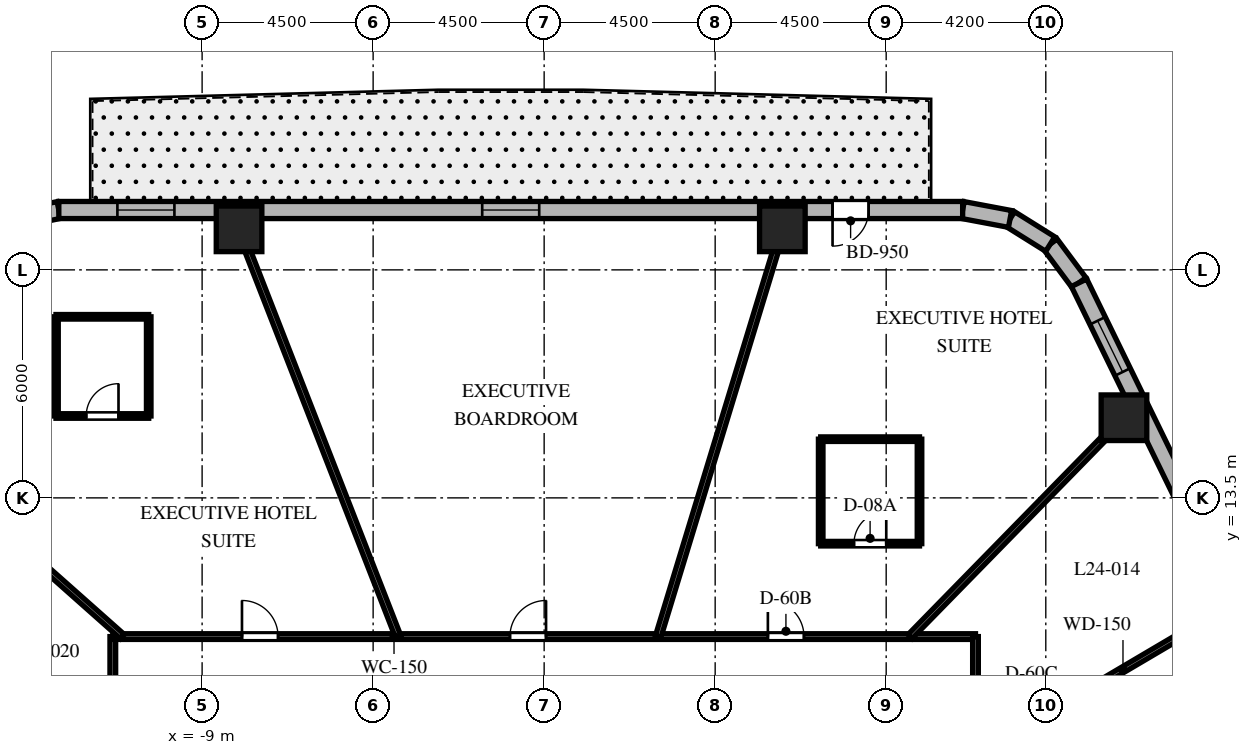
"""IFC4 building model, lengths in metres.
Left out: names, types, materials, properties, quantities, classifications, styles, units other than length and angle.
Written with IfcOpenShell. Run it as: python <this file> out.ifc"""

import sys

from ifc_helpers import new_model, si_unit, direction, frame, frame_2d, origin, origin_2d, place, context, subcontext, project, spatial, rectangle, extrude, element, fill, save


model = new_model("IFC4")
c1 = context("Model", 3, precision=1e-05, world=origin(), true_north=direction((0.0, 1.0)))
c2 = subcontext(c1, "Body", "Model", "MODEL_VIEW")
j1 = project(units=[si_unit("LENGTHUNIT", "METRE"), si_unit("PLANEANGLEUNIT", "RADIAN")], contexts=[c1])
p1 = place(None, origin())
s1 = spatial("IfcSite", under=j1, at=p1, CompositionType="ELEMENT")
p2 = place(p1, origin())
s2 = spatial("IfcBuilding", under=s1, at=p2, CompositionType="ELEMENT")
p3 = place(p2, frame((0.0, 0.0, 102.5)))
s3 = spatial("IfcBuildingStorey", under=s2, at=p3, CompositionType="ELEMENT", Elevation=102.5)
for number, where, z_axis, x_axis in (
    (1, (15.257, 15.609, 0.0), (0.0, 0.0, 1.0), (1.0, 0.0, 0.0)),
    (2, (6.268, 20.58, 0.0), (0.0, 0.0, 1.0), (1.0, 0.0, 0.0)),
    (3, (-8.028, 20.58, 0.0), (0.0, 0.0, 1.0), (1.0, 0.0, 0.0)),
):
    element("IfcColumn", number, at=place(p3, frame(where, z_axis=z_axis, x_axis=x_axis)), inside=s3, PredefinedType="COLUMN", context=c2, shape_type="SweptSolid", body=[
        extrude(rectangle(XDim=1.2, YDim=1.2, at=origin_2d()), origin(), (0.0, 0.0, 1.0), 3.7),
    ])
p4 = place(p3, frame((14.076, 19.161, 0.0), z_axis=(0.0, 0.0, 1.0), x_axis=(-0.597226657159, 0.802072515412, 0.0)))
e4 = element("IfcWall", 4, at=p4, inside=s3, PredefinedType="SOLIDWALL", context=c2, shape_type="SweptSolid", body=[
    extrude(rectangle(XDim=1.269, YDim=0.45, at=frame_2d((0.635, 0.0))), origin(), (0.0, 0.0, 1.0), 3.4),
])
p5 = place(p3, frame((13.318, 20.179, 0.0), z_axis=(0.0, 0.0, 1.0), x_axis=(-0.848031272749, 0.529946186362, 0.0)))
e5 = element("IfcWall", 5, at=p5, inside=s3, PredefinedType="SOLIDWALL", context=c2, shape_type="SweptSolid", body=[
    extrude(rectangle(XDim=1.248, YDim=0.45, at=frame_2d((0.624, 0.0))), origin(), (0.0, 0.0, 1.0), 3.4),
])
p6 = place(p3, frame((12.259, 20.84, 0.0), z_axis=(0.0, 0.0, 1.0), x_axis=(-0.982730354425, 0.185043374624, 0.0)))
e6 = element("IfcWall", 6, at=p6, inside=s3, PredefinedType="SOLIDWALL", context=c2, shape_type="SweptSolid", body=[
    extrude(rectangle(XDim=1.269, YDim=0.45, at=frame_2d((0.635, 0.0))), origin(), (0.0, 0.0, 1.0), 3.4),
])
p7 = place(p3, frame((-12.771, 21.075, 0.0), z_axis=(0.0, 0.0, 1.0), x_axis=(-0.97874281988, -0.205091424819, 0.0)))
e7 = element("IfcWall", 7, at=p7, inside=s3, PredefinedType="SOLIDWALL", context=c2, shape_type="SweptSolid", body=[
    extrude(rectangle(XDim=1.406, YDim=0.45, at=frame_2d((0.703, 0.0))), origin(), (0.0, 0.0, 1.0), 3.4),
])
p8 = place(p3, frame((22.238, 2.427, 0.0), z_axis=(0.0, 0.0, 1.0), x_axis=(-0.438374803278, 0.898792262901, 0.0)))
e8 = element("IfcWall", 8, at=p8, inside=s3, PredefinedType="SOLIDWALL", context=c2, shape_type="SweptSolid", body=[
    extrude(rectangle(XDim=18.618, YDim=0.45, at=frame_2d((9.309, 0.0))), origin(), (0.0, 0.0, 1.0), 3.4),
])
p9 = place(p8, frame((5.926, 0.0, 0.8)))
e9 = element("IfcOpeningElement", 9, at=p9, cuts=e8, PredefinedType="OPENING", context=c2, shape_type="SweptSolid", body=[
    extrude(rectangle(XDim=1.5, YDim=1.8, at=frame_2d((0.75, 0.9))), frame((0.0, 0.235, 0.0), z_axis=(0.0, -1.0, 0.0), x_axis=(1.0, 0.0, 0.0)), (0.0, 0.0, 1.0), 0.47),
])
p10 = place(p8, frame((11.165, 0.0, 0.8)))
e10 = element("IfcOpeningElement", 10, at=p10, cuts=e8, PredefinedType="OPENING", context=c2, shape_type="SweptSolid", body=[
    extrude(rectangle(XDim=1.5, YDim=1.8, at=frame_2d((0.75, 0.9))), frame((0.0, 0.235, 0.0), z_axis=(0.0, -1.0, 0.0), x_axis=(1.0, 0.0, 0.0)), (0.0, 0.0, 1.0), 0.47),
])
p11 = place(p8, frame((16.006, 0.0, 0.8)))
e11 = element("IfcOpeningElement", 11, at=p11, cuts=e8, PredefinedType="OPENING", context=c2, shape_type="SweptSolid", body=[
    extrude(rectangle(XDim=1.5, YDim=1.8, at=frame_2d((0.75, 0.9))), frame((0.0, 0.235, 0.0), z_axis=(0.0, -1.0, 0.0), x_axis=(1.0, 0.0, 0.0)), (0.0, 0.0, 1.0), 0.47),
])
p12 = place(p8, frame((1.163, 0.0, 0.8)))
e12 = element("IfcOpeningElement", 12, at=p12, cuts=e8, PredefinedType="OPENING", context=c2, shape_type="SweptSolid", body=[
    extrude(rectangle(XDim=1.5, YDim=1.8, at=frame_2d((0.75, 0.9))), frame((0.0, 0.235, 0.0), z_axis=(0.0, -1.0, 0.0), x_axis=(1.0, 0.0, 0.0)), (0.0, 0.0, 1.0), 0.47),
])
p13 = place(p3, frame((11.012, 21.075, 0.0), z_axis=(0.0, 0.0, 1.0), x_axis=(-1.0, 0.0, 0.0)))
e13 = element("IfcWall", 13, at=p13, inside=s3, PredefinedType="SOLIDWALL", context=c2, shape_type="SweptSolid", body=[
    extrude(rectangle(XDim=23.782, YDim=0.45, at=frame_2d((11.891, 0.0))), origin(), (0.0, 0.0, 1.0), 3.4),
])
p14 = place(p13, frame((2.473, 0.0, 0.0)))
e14 = element("IfcOpeningElement", 14, at=p14, cuts=e13, PredefinedType="OPENING", context=c2, shape_type="SweptSolid", body=[
    extrude(rectangle(XDim=0.95, YDim=2.15, at=frame_2d((0.475, 1.075))), frame((0.0, 0.235, 0.0), z_axis=(0.0, -1.0, 0.0), x_axis=(1.0, 0.0, 0.0)), (0.0, 0.0, 1.0), 0.47),
])
p15 = place(p13, frame((11.142, 0.0, 0.8)))
e15 = element("IfcOpeningElement", 15, at=p15, cuts=e13, PredefinedType="OPENING", context=c2, shape_type="SweptSolid", body=[
    extrude(rectangle(XDim=1.5, YDim=1.8, at=frame_2d((0.75, 0.9))), frame((0.0, 0.235, 0.0), z_axis=(0.0, -1.0, 0.0), x_axis=(1.0, 0.0, 0.0)), (0.0, 0.0, 1.0), 0.47),
])
p16 = place(p13, frame((20.741, 0.0, 0.8)))
e16 = element("IfcOpeningElement", 16, at=p16, cuts=e13, PredefinedType="OPENING", context=c2, shape_type="SweptSolid", body=[
    extrude(rectangle(XDim=1.5, YDim=1.8, at=frame_2d((0.75, 0.9))), frame((0.0, 0.235, 0.0), z_axis=(0.0, -1.0, 0.0), x_axis=(1.0, 0.0, 0.0)), (0.0, 0.0, 1.0), 0.47),
])
p17 = place(p3, frame((-11.35, -9.85, 0.0), z_axis=(0.0, 0.0, 1.0), x_axis=(0.0, 1.0, 0.0)))
e17 = element("IfcWall", 17, at=p17, inside=s3, PredefinedType="PARTITIONING", context=c2, shape_type="SweptSolid", body=[
    extrude(rectangle(XDim=19.7, YDim=0.15, at=frame_2d((9.85, 0.0))), origin(), (0.0, 0.0, 1.0), 2.84),
])
p18 = place(p17, frame((16.711, 0.0, 0.0)))
e18 = element("IfcOpeningElement", 18, at=p18, cuts=e17, PredefinedType="OPENING", context=c2, shape_type="SweptSolid", body=[
    extrude(rectangle(XDim=0.95, YDim=2.03, at=frame_2d((0.475, 1.015))), frame((0.0, 0.085, 0.0), z_axis=(0.0, -1.0, 0.0), x_axis=(1.0, 0.0, 0.0)), (0.0, 0.0, 1.0), 0.17),
])
p19 = place(p17, frame((12.968, 0.0, 0.0)))
e19 = element("IfcOpeningElement", 19, at=p19, cuts=e17, PredefinedType="OPENING", context=c2, shape_type="SweptSolid", body=[
    extrude(rectangle(XDim=0.9, YDim=2.03, at=frame_2d((0.45, 1.015))), frame((0.0, 0.085, 0.0), z_axis=(0.0, -1.0, 0.0), x_axis=(1.0, 0.0, 0.0)), (0.0, 0.0, 1.0), 0.17),
])
p20 = place(p17, frame((10.325, 0.0, 0.0)))
e20 = element("IfcOpeningElement", 20, at=p20, cuts=e17, PredefinedType="OPENING", context=c2, shape_type="SweptSolid", body=[
    extrude(rectangle(XDim=0.9, YDim=2.03, at=frame_2d((0.45, 1.015))), frame((0.0, 0.085, 0.0), z_axis=(0.0, -1.0, 0.0), x_axis=(1.0, 0.0, 0.0)), (0.0, 0.0, 1.0), 0.17),
])
p21 = place(p17, frame((7.706, 0.0, 0.0)))
e21 = element("IfcOpeningElement", 21, at=p21, cuts=e17, PredefinedType="OPENING", context=c2, shape_type="SweptSolid", body=[
    extrude(rectangle(XDim=0.95, YDim=2.03, at=frame_2d((0.475, 1.015))), frame((0.0, 0.085, 0.0), z_axis=(0.0, -1.0, 0.0), x_axis=(1.0, 0.0, 0.0)), (0.0, 0.0, 1.0), 0.17),
])
p22 = place(p17, frame((3.008, 0.0, 0.0)))
e22 = element("IfcOpeningElement", 22, at=p22, cuts=e17, PredefinedType="OPENING", context=c2, shape_type="SweptSolid", body=[
    extrude(rectangle(XDim=0.95, YDim=2.03, at=frame_2d((0.475, 1.015))), frame((0.0, 0.085, 0.0), z_axis=(0.0, -1.0, 0.0), x_axis=(1.0, 0.0, 0.0)), (0.0, 0.0, 1.0), 0.17),
])
p23 = place(p3, frame((-11.35, 9.85, 0.0), z_axis=(0.0, 0.0, 1.0), x_axis=(1.0, 0.0, 0.0)))
e23 = element("IfcWall", 23, at=p23, inside=s3, PredefinedType="PARTITIONING", context=c2, shape_type="SweptSolid", body=[
    extrude(rectangle(XDim=22.7, YDim=0.15, at=frame_2d((11.35, 0.0))), origin(), (0.0, 0.0, 1.0), 2.84),
])
p24 = place(p23, frame((17.237, 0.0, 0.0)))
e24 = element("IfcOpeningElement", 24, at=p24, cuts=e23, PredefinedType="OPENING", context=c2, shape_type="SweptSolid", body=[
    extrude(rectangle(XDim=0.95, YDim=2.03, at=frame_2d((0.475, 1.015))), frame((0.0, 0.085, 0.0), z_axis=(0.0, -1.0, 0.0), x_axis=(1.0, 0.0, 0.0)), (0.0, 0.0, 1.0), 0.17),
])
p25 = place(p23, frame((10.45, 0.0, 0.0)))
e25 = element("IfcOpeningElement", 25, at=p25, cuts=e23, PredefinedType="OPENING", context=c2, shape_type="SweptSolid", body=[
    extrude(rectangle(XDim=0.95, YDim=2.03, at=frame_2d((0.475, 1.015))), frame((0.0, 0.085, 0.0), z_axis=(0.0, -1.0, 0.0), x_axis=(1.0, 0.0, 0.0)), (0.0, 0.0, 1.0), 0.17),
])
p26 = place(p23, frame((3.399, 0.0, 0.0)))
e26 = element("IfcOpeningElement", 26, at=p26, cuts=e23, PredefinedType="OPENING", context=c2, shape_type="SweptSolid", body=[
    extrude(rectangle(XDim=0.95, YDim=2.03, at=frame_2d((0.475, 1.015))), frame((0.0, 0.085, 0.0), z_axis=(0.0, -1.0, 0.0), x_axis=(1.0, 0.0, 0.0)), (0.0, 0.0, 1.0), 0.17),
])
p27 = place(p3, frame((11.35, 9.85, 0.0), z_axis=(0.0, 0.0, 1.0), x_axis=(0.0, -1.0, 0.0)))
e27 = element("IfcWall", 27, at=p27, inside=s3, PredefinedType="PARTITIONING", context=c2, shape_type="SweptSolid", body=[
    extrude(rectangle(XDim=19.7, YDim=0.15, at=frame_2d((9.85, 0.0))), origin(), (0.0, 0.0, 1.0), 2.84),
])
p28 = place(p27, frame((4.448, 0.0, 0.0)))
e28 = element("IfcOpeningElement", 28, at=p28, cuts=e27, PredefinedType="OPENING", context=c2, shape_type="SweptSolid", body=[
    extrude(rectangle(XDim=0.95, YDim=2.03, at=frame_2d((0.475, 1.015))), frame((0.0, 0.085, 0.0), z_axis=(0.0, -1.0, 0.0), x_axis=(1.0, 0.0, 0.0)), (0.0, 0.0, 1.0), 0.17),
])
p29 = place(p27, frame((1.249, 0.0, 0.0)))
e29 = element("IfcOpeningElement", 29, at=p29, cuts=e27, PredefinedType="OPENING", context=c2, shape_type="SweptSolid", body=[
    extrude(rectangle(XDim=0.9, YDim=2.03, at=frame_2d((0.45, 1.015))), frame((0.0, 0.085, 0.0), z_axis=(0.0, -1.0, 0.0), x_axis=(1.0, 0.0, 0.0)), (0.0, 0.0, 1.0), 0.17),
])
p30 = place(p27, frame((15.205, 0.0, 0.0)))
e30 = element("IfcOpeningElement", 30, at=p30, cuts=e27, PredefinedType="OPENING", context=c2, shape_type="SweptSolid", body=[
    extrude(rectangle(XDim=0.95, YDim=2.03, at=frame_2d((0.475, 1.015))), frame((0.0, 0.085, 0.0), z_axis=(0.0, -1.0, 0.0), x_axis=(1.0, 0.0, 0.0)), (0.0, 0.0, 1.0), 0.17),
])
p31 = place(p27, frame((8.836, 0.0, 0.0)))
e31 = element("IfcOpeningElement", 31, at=p31, cuts=e27, PredefinedType="OPENING", context=c2, shape_type="SweptSolid", body=[
    extrude(rectangle(XDim=0.95, YDim=2.03, at=frame_2d((0.475, 1.015))), frame((0.0, 0.085, 0.0), z_axis=(0.0, -1.0, 0.0), x_axis=(1.0, 0.0, 0.0)), (0.0, 0.0, 1.0), 0.17),
])
p32 = place(p3, frame((11.35, 6.691, 0.0), z_axis=(0.0, 0.0, 1.0), x_axis=(0.861446954497, 0.507847560383, 0.0)))
e32 = element("IfcWall", 32, at=p32, inside=s3, PredefinedType="PARTITIONING", context=c2, shape_type="SweptSolid", body=[
    extrude(rectangle(XDim=7.941, YDim=0.15, at=frame_2d((3.97, 0.0))), origin(), (0.0, 0.0, 1.0), 2.54),
])
p33 = place(p3, frame((9.628, 9.85, 0.0), z_axis=(0.0, 0.0, 1.0), x_axis=(0.698992824326, 0.715128681805, 0.0)))
e33 = element("IfcWall", 33, at=p33, inside=s3, PredefinedType="PARTITIONING", context=c2, shape_type="SweptSolid", body=[
    extrude(rectangle(XDim=8.579, YDim=0.15, at=frame_2d((4.29, 0.0))), origin(), (0.0, 0.0, 1.0), 2.54),
])
p34 = place(p3, frame((3.0, 9.85, 0.0), z_axis=(0.0, 0.0, 1.0), x_axis=(0.291352035382, 0.95661590593, 0.0)))
e34 = element("IfcWall", 34, at=p34, inside=s3, PredefinedType="PARTITIONING", context=c2, shape_type="SweptSolid", body=[
    extrude(rectangle(XDim=11.734, YDim=0.15, at=frame_2d((5.867, 0.0))), origin(), (0.0, 0.0, 1.0), 2.54),
])
p35 = place(p3, frame((-3.842, 9.85, 0.0), z_axis=(0.0, 0.0, 1.0), x_axis=(-0.363432685593, 0.931620460833, 0.0)))
e35 = element("IfcWall", 35, at=p35, inside=s3, PredefinedType="PARTITIONING", context=c2, shape_type="SweptSolid", body=[
    extrude(rectangle(XDim=12.049, YDim=0.15, at=frame_2d((6.024, 0.0))), origin(), (0.0, 0.0, 1.0), 2.54),
])
p36 = place(p3, frame((-11.098, 9.85, 0.0), z_axis=(0.0, 0.0, 1.0), x_axis=(-0.747904295103, 0.663806572253, 0.0)))
e36 = element("IfcWall", 36, at=p36, inside=s3, PredefinedType="PARTITIONING", context=c2, shape_type="SweptSolid", body=[
    extrude(rectangle(XDim=8.16, YDim=0.15, at=frame_2d((4.08, 0.0))), origin(), (0.0, 0.0, 1.0), 2.54),
])
p37 = place(p3, frame((7.277, 12.295, 0.0), z_axis=(0.0, 0.0, 1.0), x_axis=(1.0, 0.0, 0.0)))
e37 = element("IfcWall", 37, at=p37, inside=s3, PredefinedType="PARTITIONING", context=c2, shape_type="SweptSolid", body=[
    extrude(rectangle(XDim=2.6, YDim=0.12, at=frame_2d((1.3, 0.0))), origin(), (0.0, 0.0, 1.0), 2.84),
])
p38 = place(p37, frame((0.875, 0.0, 0.0)))
e38 = element("IfcOpeningElement", 38, at=p38, cuts=e37, PredefinedType="OPENING", context=c2, shape_type="SweptSolid", body=[
    extrude(rectangle(XDim=0.85, YDim=2.03, at=frame_2d((0.425, 1.015))), frame((0.0, 0.07, 0.0), z_axis=(0.0, -1.0, 0.0), x_axis=(1.0, 0.0, 0.0)), (0.0, 0.0, 1.0), 0.14),
])
p39 = place(p3, frame((9.877, 12.295, 0.0), z_axis=(0.0, 0.0, 1.0), x_axis=(0.0, 1.0, 0.0)))
e39 = element("IfcWall", 39, at=p39, inside=s3, PredefinedType="PARTITIONING", context=c2, shape_type="SweptSolid", body=[
    extrude(rectangle(XDim=2.75, YDim=0.12, at=frame_2d((1.375, 0.0))), origin(), (0.0, 0.0, 1.0), 2.972),
])
p40 = place(p3, frame((9.877, 15.045, 0.0), z_axis=(0.0, 0.0, 1.0), x_axis=(-1.0, 0.0, 0.0)))
e40 = element("IfcWall", 40, at=p40, inside=s3, PredefinedType="PARTITIONING", context=c2, shape_type="SweptSolid", body=[
    extrude(rectangle(XDim=2.6, YDim=0.12, at=frame_2d((1.3, 0.0))), origin(), (0.0, 0.0, 1.0), 2.972),
])
p41 = place(p3, frame((7.277, 15.045, 0.0), z_axis=(0.0, 0.0, 1.0), x_axis=(0.0, -1.0, 0.0)))
e41 = element("IfcWall", 41, at=p41, inside=s3, PredefinedType="PARTITIONING", context=c2, shape_type="SweptSolid", body=[
    extrude(rectangle(XDim=2.75, YDim=0.12, at=frame_2d((1.375, 0.0))), origin(), (0.0, 0.0, 1.0), 2.84),
])
p42 = place(p3, frame((-12.845, 15.655, 0.0), z_axis=(0.0, 0.0, 1.0), x_axis=(1.0, 0.0, 0.0)))
e42 = element("IfcWall", 42, at=p42, inside=s3, PredefinedType="PARTITIONING", context=c2, shape_type="SweptSolid", body=[
    extrude(rectangle(XDim=2.44, YDim=0.12, at=frame_2d((1.22, 0.0))), origin(), (0.0, 0.0, 1.0), 3.4),
])
p43 = place(p42, frame((0.795, 0.0, 0.0)))
e43 = element("IfcOpeningElement", 43, at=p43, cuts=e42, PredefinedType="OPENING", context=c2, shape_type="SweptSolid", body=[
    extrude(rectangle(XDim=0.85, YDim=2.03, at=frame_2d((0.425, 1.015))), frame((0.0, 0.07, 0.0), z_axis=(0.0, -1.0, 0.0), x_axis=(1.0, 0.0, 0.0)), (0.0, 0.0, 1.0), 0.14),
])
p44 = place(p3, frame((-10.405, 15.655, 0.0), z_axis=(0.0, 0.0, 1.0), x_axis=(0.0, 1.0, 0.0)))
e44 = element("IfcWall", 44, at=p44, inside=s3, PredefinedType="PARTITIONING", context=c2, shape_type="SweptSolid", body=[
    extrude(rectangle(XDim=2.61, YDim=0.12, at=frame_2d((1.305, 0.0))), origin(), (0.0, 0.0, 1.0), 3.4),
])
p45 = place(p3, frame((-10.405, 18.265, 0.0), z_axis=(0.0, 0.0, 1.0), x_axis=(-1.0, 0.0, 0.0)))
e45 = element("IfcWall", 45, at=p45, inside=s3, PredefinedType="PARTITIONING", context=c2, shape_type="SweptSolid", body=[
    extrude(rectangle(XDim=2.44, YDim=0.12, at=frame_2d((1.22, 0.0))), origin(), (0.0, 0.0, 1.0), 2.54),
])
p46 = place(p3, frame((-12.845, 18.265, 0.0), z_axis=(0.0, 0.0, 1.0), x_axis=(0.0, -1.0, 0.0)))
e46 = element("IfcWall", 46, at=p46, inside=s3, PredefinedType="PARTITIONING", context=c2, shape_type="SweptSolid", body=[
    extrude(rectangle(XDim=2.61, YDim=0.12, at=frame_2d((1.305, 0.0))), origin(), (0.0, 0.0, 1.0), 2.54),
])
p47 = place(p11, origin())
e47 = element("IfcWindow", 47, at=p47, inside=s3, PartitioningType="SINGLE_PANEL", PredefinedType="WINDOW", context=c2, shape_type="SweptSolid", body=[
    extrude(rectangle(XDim=1.5, YDim=1.8, at=frame_2d((0.75, 0.9))), frame((0.0, 0.03, 0.0), z_axis=(0.0, -1.0, 0.0), x_axis=(1.0, 0.0, 0.0)), (0.0, 0.0, 1.0), 0.06),
])
fill(e11, e47)
p48 = place(p14, origin())
e48 = element("IfcDoor", 48, at=p48, inside=s3, OperationType="SINGLE_SWING_RIGHT", PredefinedType="DOOR", context=c2, shape_type="SweptSolid", body=[
    extrude(rectangle(XDim=0.95, YDim=2.15, at=frame_2d((0.475, 1.075))), frame((0.0, 0.025, 0.0), z_axis=(0.0, -1.0, 0.0), x_axis=(1.0, 0.0, 0.0)), (0.0, 0.0, 1.0), 0.05),
])
fill(e14, e48)
p49 = place(p15, origin())
e49 = element("IfcWindow", 49, at=p49, inside=s3, PartitioningType="SINGLE_PANEL", PredefinedType="WINDOW", context=c2, shape_type="SweptSolid", body=[
    extrude(rectangle(XDim=1.5, YDim=1.8, at=frame_2d((0.75, 0.9))), frame((0.0, 0.03, 0.0), z_axis=(0.0, -1.0, 0.0), x_axis=(1.0, 0.0, 0.0)), (0.0, 0.0, 1.0), 0.06),
])
fill(e15, e49)
p50 = place(p16, origin())
e50 = element("IfcWindow", 50, at=p50, inside=s3, PartitioningType="SINGLE_PANEL", PredefinedType="WINDOW", context=c2, shape_type="SweptSolid", body=[
    extrude(rectangle(XDim=1.5, YDim=1.8, at=frame_2d((0.75, 0.9))), frame((0.0, 0.03, 0.0), z_axis=(0.0, -1.0, 0.0), x_axis=(1.0, 0.0, 0.0)), (0.0, 0.0, 1.0), 0.06),
])
fill(e16, e50)
p51 = place(p24, origin())
e51 = element("IfcDoor", 51, at=p51, inside=s3, OperationType="SINGLE_SWING_LEFT", PredefinedType="DOOR", context=c2, shape_type="SweptSolid", body=[
    extrude(rectangle(XDim=0.95, YDim=2.03, at=frame_2d((0.475, 1.015))), frame((0.0, 0.025, 0.0), z_axis=(0.0, -1.0, 0.0), x_axis=(1.0, 0.0, 0.0)), (0.0, 0.0, 1.0), 0.05),
])
fill(e24, e51)
p52 = place(p38, origin())
e52 = element("IfcDoor", 52, at=p52, inside=s3, OperationType="SINGLE_SWING_RIGHT", PredefinedType="DOOR", context=c2, shape_type="SweptSolid", body=[
    extrude(rectangle(XDim=0.85, YDim=2.03, at=frame_2d((0.425, 1.015))), frame((0.0, 0.025, 0.0), z_axis=(0.0, -1.0, 0.0), x_axis=(1.0, 0.0, 0.0)), (0.0, 0.0, 1.0), 0.05),
])
fill(e38, e52)
p53 = place(p25, origin())
e53 = element("IfcDoor", 53, at=p53, inside=s3, OperationType="SINGLE_SWING_RIGHT", PredefinedType="DOOR", context=c2, shape_type="SweptSolid", body=[
    extrude(rectangle(XDim=0.95, YDim=2.03, at=frame_2d((0.475, 1.015))), frame((0.0, 0.025, 0.0), z_axis=(0.0, -1.0, 0.0), x_axis=(1.0, 0.0, 0.0)), (0.0, 0.0, 1.0), 0.05),
])
fill(e25, e53)
p54 = place(p26, origin())
e54 = element("IfcDoor", 54, at=p54, inside=s3, OperationType="SINGLE_SWING_LEFT", PredefinedType="DOOR", context=c2, shape_type="SweptSolid", body=[
    extrude(rectangle(XDim=0.95, YDim=2.03, at=frame_2d((0.475, 1.015))), frame((0.0, 0.025, 0.0), z_axis=(0.0, -1.0, 0.0), x_axis=(1.0, 0.0, 0.0)), (0.0, 0.0, 1.0), 0.05),
])
fill(e26, e54)
p55 = place(p43, origin())
e55 = element("IfcDoor", 55, at=p55, inside=s3, OperationType="SINGLE_SWING_RIGHT", PredefinedType="DOOR", context=c2, shape_type="SweptSolid", body=[
    extrude(rectangle(XDim=0.85, YDim=2.03, at=frame_2d((0.425, 1.015))), frame((0.0, 0.025, 0.0), z_axis=(0.0, -1.0, 0.0), x_axis=(1.0, 0.0, 0.0)), (0.0, 0.0, 1.0), 0.05),
])
fill(e43, e55)
save(model, sys.argv[1])
